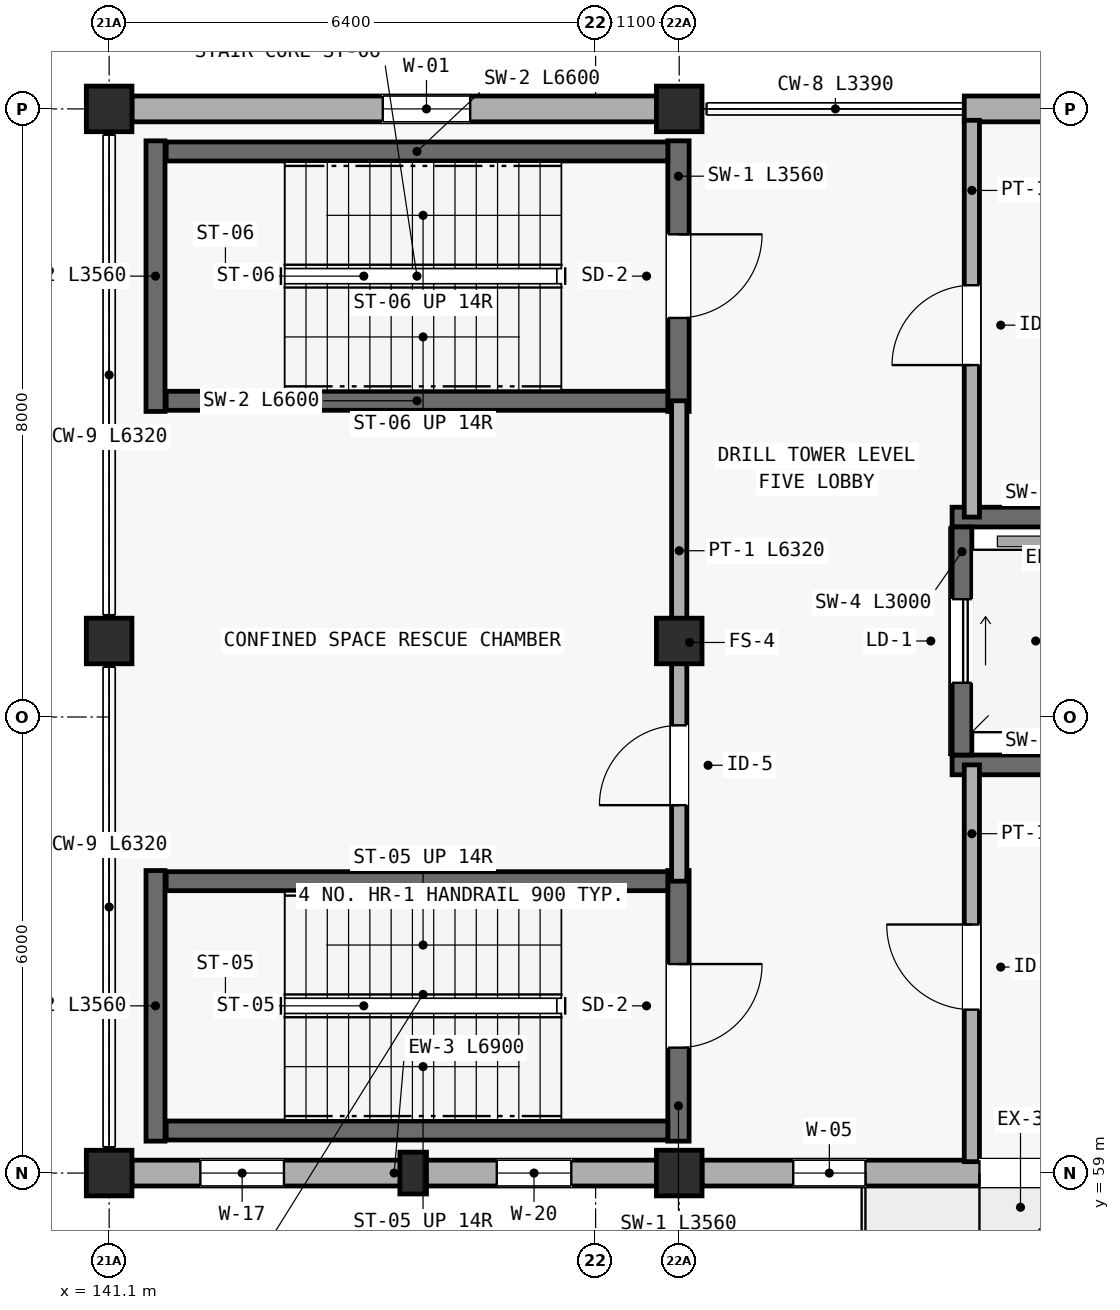
"""IFC4 building model, lengths in metres.
Left out: names, types, materials, properties, quantities, classifications, styles, units other than length and angle.
Written with IfcOpenShell. Run it as: python <this file> out.ifc"""

import sys

from ifc_helpers import new_model, si_unit, direction, frame, frame_2d, origin, origin_2d, place, context, subcontext, project, spatial, rectangle, extrude, element, fill, save


model = new_model("IFC4")
c1 = context("Model", 3, precision=1e-05, world=origin(), true_north=direction((0.0, 1.0)))
c2 = subcontext(c1, "Body", "Model", "MODEL_VIEW")
j1 = project(units=[si_unit("LENGTHUNIT", "METRE"), si_unit("PLANEANGLEUNIT", "RADIAN")], contexts=[c1])
p1 = place(None, origin())
s1 = spatial("IfcSite", under=j1, at=p1, CompositionType="ELEMENT")
p2 = place(p1, origin())
s2 = spatial("IfcBuilding", under=s1, at=p2, CompositionType="ELEMENT")
p3 = place(p2, frame((0.0, 0.0, 17.4)))
s3 = spatial("IfcBuildingStorey", under=s2, at=p3, CompositionType="ELEMENT", Elevation=17.4)
for number, where, z_axis, x_axis in (
    (1, (141.1, 59.0, 0.0), (0.0, 0.0, 1.0), (1.0, 0.0, 0.0)),
    (2, (141.1, 66.0, 0.0), (0.0, 0.0, 1.0), (1.0, 0.0, 0.0)),
    (3, (141.1, 73.0, 0.0), (0.0, 0.0, 1.0), (1.0, 0.0, 0.0)),
    (4, (148.6, 59.0, 0.0), (0.0, 0.0, 1.0), (1.0, 0.0, 0.0)),
    (5, (148.6, 66.0, 0.0), (0.0, 0.0, 1.0), (1.0, 0.0, 0.0)),
    (6, (148.6, 73.0, 0.0), (0.0, 0.0, 1.0), (1.0, 0.0, 0.0)),
):
    element("IfcColumn", number, at=place(p3, frame(where, z_axis=z_axis, x_axis=x_axis)), inside=s3, PredefinedType="COLUMN", context=c2, shape_type="SweptSolid", body=[
        extrude(rectangle(XDim=0.6, YDim=0.6, at=origin_2d()), origin(), (0.0, 0.0, 1.0), 4.65),
    ])
p4 = place(p3, frame((145.1, 59.0, 0.0), z_axis=(0.0, 0.0, 1.0), x_axis=(1.0, 0.0, 0.0)))
e7 = element("IfcColumn", 7, at=p4, inside=s3, PredefinedType="PILASTER", context=c2, shape_type="SweptSolid", body=[
    extrude(rectangle(XDim=0.35, YDim=0.55, at=origin_2d()), origin(), (0.0, 0.0, 1.0), 4.65),
])
p5 = place(p3, frame((141.4, 59.0, 0.0), z_axis=(0.0, 0.0, 1.0), x_axis=(1.0, 0.0, 0.0)))
e8 = element("IfcWall", 8, at=p5, inside=s3, PredefinedType="STANDARD", context=c2, shape_type="SweptSolid", body=[
    extrude(rectangle(XDim=6.9, YDim=0.34, at=frame_2d((3.45, 0.0))), origin(), (0.0, 0.0, 1.0), 3.95),
])
p6 = place(p5, frame((0.9, 0.0, 0.75)))
e9 = element("IfcOpeningElement", 9, at=p6, cuts=e8, PredefinedType="OPENING", context=c2, shape_type="SweptSolid", body=[
    extrude(rectangle(XDim=1.1, YDim=1.35, at=frame_2d((0.55, 0.675))), frame((0.0, 0.18, 0.0), z_axis=(0.0, -1.0, 0.0), x_axis=(1.0, 0.0, 0.0)), (0.0, 0.0, 1.0), 0.36),
])
p7 = place(p5, frame((4.8, 0.0, 0.75)))
e10 = element("IfcOpeningElement", 10, at=p7, cuts=e8, PredefinedType="OPENING", context=c2, shape_type="SweptSolid", body=[
    extrude(rectangle(XDim=0.98, YDim=1.45, at=frame_2d((0.49, 0.725))), frame((0.0, 0.18, 0.0), z_axis=(0.0, -1.0, 0.0), x_axis=(1.0, 0.0, 0.0)), (0.0, 0.0, 1.0), 0.36),
])
p8 = place(p3, frame((148.9, 59.0, 0.0), z_axis=(0.0, 0.0, 1.0), x_axis=(1.0, 0.0, 0.0)))
e11 = element("IfcWall", 11, at=p8, inside=s3, PredefinedType="STANDARD", context=c2, shape_type="SweptSolid", body=[
    extrude(rectangle(XDim=11.8, YDim=0.34, at=frame_2d((5.9, 0.0))), origin(), (0.0, 0.0, 1.0), 3.95),
])
p9 = place(p8, frame((3.65, 0.0, 0.0)))
e12 = element("IfcOpeningElement", 12, at=p9, cuts=e11, PredefinedType="OPENING", context=c2, shape_type="SweptSolid", body=[
    extrude(rectangle(XDim=1.08, YDim=2.1, at=frame_2d((0.54, 1.05))), frame((0.0, 0.18, 0.0), z_axis=(0.0, -1.0, 0.0), x_axis=(1.0, 0.0, 0.0)), (0.0, 0.0, 1.0), 0.36),
])
p10 = place(p8, frame((1.2, 0.0, 0.75)))
e13 = element("IfcOpeningElement", 13, at=p10, cuts=e11, PredefinedType="OPENING", context=c2, shape_type="SweptSolid", body=[
    extrude(rectangle(XDim=0.95, YDim=1.35, at=frame_2d((0.475, 0.675))), frame((0.0, 0.18, 0.0), z_axis=(0.0, -1.0, 0.0), x_axis=(1.0, 0.0, 0.0)), (0.0, 0.0, 1.0), 0.36),
])
p11 = place(p8, frame((6.8, 0.0, 0.75)))
e14 = element("IfcOpeningElement", 14, at=p11, cuts=e11, PredefinedType="OPENING", context=c2, shape_type="SweptSolid", body=[
    extrude(rectangle(XDim=0.95, YDim=1.35, at=frame_2d((0.475, 0.675))), frame((0.0, 0.18, 0.0), z_axis=(0.0, -1.0, 0.0), x_axis=(1.0, 0.0, 0.0)), (0.0, 0.0, 1.0), 0.36),
])
p12 = place(p3, frame((160.7, 73.0, 0.0), z_axis=(0.0, 0.0, 1.0), x_axis=(-1.0, 0.0, 0.0)))
e15 = element("IfcWall", 15, at=p12, inside=s3, PredefinedType="STANDARD", context=c2, shape_type="SweptSolid", body=[
    extrude(rectangle(XDim=8.35, YDim=0.34, at=frame_2d((4.175, 0.0))), origin(), (0.0, 0.0, 1.0), 3.95),
])
p13 = place(p12, frame((1.35, 0.0, 0.75)))
e16 = element("IfcOpeningElement", 16, at=p13, cuts=e15, PredefinedType="OPENING", context=c2, shape_type="SweptSolid", body=[
    extrude(rectangle(XDim=0.88, YDim=1.5, at=frame_2d((0.44, 0.75))), frame((0.0, 0.18, 0.0), z_axis=(0.0, -1.0, 0.0), x_axis=(1.0, 0.0, 0.0)), (0.0, 0.0, 1.0), 0.36),
])
p14 = place(p12, frame((4.95, 0.0, 0.75)))
e17 = element("IfcOpeningElement", 17, at=p14, cuts=e15, PredefinedType="OPENING", context=c2, shape_type="SweptSolid", body=[
    extrude(rectangle(XDim=0.88, YDim=1.5, at=frame_2d((0.44, 0.75))), frame((0.0, 0.18, 0.0), z_axis=(0.0, -1.0, 0.0), x_axis=(1.0, 0.0, 0.0)), (0.0, 0.0, 1.0), 0.36),
])
p15 = place(p3, frame((148.3, 73.0, 0.0), z_axis=(0.0, 0.0, 1.0), x_axis=(-1.0, 0.0, 0.0)))
e18 = element("IfcWall", 18, at=p15, inside=s3, PredefinedType="STANDARD", context=c2, shape_type="SweptSolid", body=[
    extrude(rectangle(XDim=6.9, YDim=0.34, at=frame_2d((3.45, 0.0))), origin(), (0.0, 0.0, 1.0), 3.95),
])
p16 = place(p15, frame((2.45, 0.0, 0.75)))
e19 = element("IfcOpeningElement", 19, at=p16, cuts=e18, PredefinedType="OPENING", context=c2, shape_type="SweptSolid", body=[
    extrude(rectangle(XDim=1.15, YDim=1.45, at=frame_2d((0.575, 0.725))), frame((0.0, 0.18, 0.0), z_axis=(0.0, -1.0, 0.0), x_axis=(1.0, 0.0, 0.0)), (0.0, 0.0, 1.0), 0.36),
])
p17 = place(p3, frame((148.59, 62.98, 0.0), z_axis=(0.0, 0.0, 1.0), x_axis=(0.0, -1.0, 0.0)))
e20 = element("IfcWall", 20, at=p17, inside=s3, PredefinedType="SHEAR", context=c2, shape_type="SweptSolid", body=[
    extrude(rectangle(XDim=3.56, YDim=0.28, at=frame_2d((1.78, 0.0))), origin(), (0.0, 0.0, 1.0), 4.4),
])
p18 = place(p17, frame((1.23, 0.0, 0.0)))
e21 = element("IfcOpeningElement", 21, at=p18, cuts=e20, PredefinedType="OPENING", context=c2, shape_type="SweptSolid", body=[
    extrude(rectangle(XDim=1.1, YDim=2.15, at=frame_2d((0.55, 1.075))), frame((0.0, 0.15, 0.0), z_axis=(0.0, -1.0, 0.0), x_axis=(1.0, 0.0, 0.0)), (0.0, 0.0, 1.0), 0.3),
])
p19 = place(p3, frame((141.71, 59.42, 0.0), z_axis=(0.0, 0.0, 1.0), x_axis=(0.0, 1.0, 0.0)))
e22 = element("IfcWall", 22, at=p19, inside=s3, PredefinedType="SHEAR", context=c2, shape_type="SweptSolid", body=[
    extrude(rectangle(XDim=3.56, YDim=0.25, at=frame_2d((1.78, 0.0))), origin(), (0.0, 0.0, 1.0), 4.4),
])
for number, where, z_axis, x_axis in (
    (23, (148.45, 62.84, 0.0), (0.0, 0.0, 1.0), (-1.0, 0.0, 0.0)),
    (24, (141.85, 59.56, 0.0), (0.0, 0.0, 1.0), (1.0, 0.0, 0.0)),
):
    element("IfcWall", number, at=place(p3, frame(where, z_axis=z_axis, x_axis=x_axis)), inside=s3, PredefinedType="SHEAR", context=c2, shape_type="SweptSolid", body=[
        extrude(rectangle(XDim=6.6, YDim=0.25, at=frame_2d((3.3, 0.0))), origin(), (0.0, 0.0, 1.0), 4.4),
    ])
p20 = place(p3, frame((148.59, 72.58, 0.0), z_axis=(0.0, 0.0, 1.0), x_axis=(0.0, -1.0, 0.0)))
e25 = element("IfcWall", 25, at=p20, inside=s3, PredefinedType="SHEAR", context=c2, shape_type="SweptSolid", body=[
    extrude(rectangle(XDim=3.56, YDim=0.28, at=frame_2d((1.78, 0.0))), origin(), (0.0, 0.0, 1.0), 4.4),
])
p21 = place(p20, frame((1.23, 0.0, 0.0)))
e26 = element("IfcOpeningElement", 26, at=p21, cuts=e25, PredefinedType="OPENING", context=c2, shape_type="SweptSolid", body=[
    extrude(rectangle(XDim=1.1, YDim=2.15, at=frame_2d((0.55, 1.075))), frame((0.0, 0.15, 0.0), z_axis=(0.0, -1.0, 0.0), x_axis=(1.0, 0.0, 0.0)), (0.0, 0.0, 1.0), 0.3),
])
p22 = place(p3, frame((141.71, 69.02, 0.0), z_axis=(0.0, 0.0, 1.0), x_axis=(0.0, 1.0, 0.0)))
e27 = element("IfcWall", 27, at=p22, inside=s3, PredefinedType="SHEAR", context=c2, shape_type="SweptSolid", body=[
    extrude(rectangle(XDim=3.56, YDim=0.25, at=frame_2d((1.78, 0.0))), origin(), (0.0, 0.0, 1.0), 4.4),
])
for number, where, z_axis, x_axis in (
    (28, (148.45, 72.44, 0.0), (0.0, 0.0, 1.0), (-1.0, 0.0, 0.0)),
    (29, (141.85, 69.16, 0.0), (0.0, 0.0, 1.0), (1.0, 0.0, 0.0)),
):
    element("IfcWall", number, at=place(p3, frame(where, z_axis=z_axis, x_axis=x_axis)), inside=s3, PredefinedType="SHEAR", context=c2, shape_type="SweptSolid", body=[
        extrude(rectangle(XDim=6.6, YDim=0.25, at=frame_2d((3.3, 0.0))), origin(), (0.0, 0.0, 1.0), 4.4),
    ])
for number, where, z_axis, x_axis in (
    (30, (152.19, 64.37, 0.0), (0.0, 0.0, 1.0), (1.0, 0.0, 0.0)),
    (31, (155.11, 67.63, 0.0), (0.0, 0.0, 1.0), (-1.0, 0.0, 0.0)),
):
    element("IfcWall", number, at=place(p3, frame(where, z_axis=z_axis, x_axis=x_axis)), inside=s3, PredefinedType="SHEAR", context=c2, shape_type="SweptSolid", body=[
        extrude(rectangle(XDim=2.92, YDim=0.26, at=frame_2d((1.46, 0.0))), origin(), (0.0, 0.0, 1.0), 4.4),
    ])
p23 = place(p3, frame((152.32, 67.5, 0.0), z_axis=(0.0, 0.0, 1.0), x_axis=(0.0, -1.0, 0.0)))
e32 = element("IfcWall", 32, at=p23, inside=s3, PredefinedType="SHEAR", context=c2, shape_type="SweptSolid", body=[
    extrude(rectangle(XDim=3.0, YDim=0.26, at=frame_2d((1.5, 0.0))), origin(), (0.0, 0.0, 1.0), 4.4),
])
p24 = place(p23, frame((0.95, 0.0, 0.0)))
e33 = element("IfcOpeningElement", 33, at=p24, cuts=e32, PredefinedType="OPENING", context=c2, shape_type="SweptSolid", body=[
    extrude(rectangle(XDim=1.1, YDim=2.15, at=frame_2d((0.55, 1.075))), frame((0.0, 0.14, 0.0), z_axis=(0.0, -1.0, 0.0), x_axis=(1.0, 0.0, 0.0)), (0.0, 0.0, 1.0), 0.28),
])
p25 = place(p3, frame((148.6, 62.84, 0.0), z_axis=(0.0, 0.0, 1.0), x_axis=(0.0, 1.0, 0.0)))
e34 = element("IfcWall", 34, at=p25, inside=s3, PredefinedType="PARTITIONING", context=c2, shape_type="SweptSolid", body=[
    extrude(rectangle(XDim=6.32, YDim=0.2, at=frame_2d((3.16, 0.0))), origin(), (0.0, 0.0, 1.0), 3.9),
])
p26 = place(p25, frame((1.0, 0.0, 0.0)))
e35 = element("IfcOpeningElement", 35, at=p26, cuts=e34, PredefinedType="OPENING", context=c2, shape_type="SweptSolid", body=[
    extrude(rectangle(XDim=1.05, YDim=2.14, at=frame_2d((0.525, 1.07))), frame((0.0, 0.11, 0.0), z_axis=(0.0, -1.0, 0.0), x_axis=(1.0, 0.0, 0.0)), (0.0, 0.0, 1.0), 0.22),
])
p27 = place(p3, frame((152.45, 59.15, 0.0), z_axis=(0.0, 0.0, 1.0), x_axis=(0.0, 1.0, 0.0)))
e36 = element("IfcWall", 36, at=p27, inside=s3, PredefinedType="PARTITIONING", context=c2, shape_type="SweptSolid", body=[
    extrude(rectangle(XDim=5.22, YDim=0.2, at=frame_2d((2.61, 0.0))), origin(), (0.0, 0.0, 1.0), 3.9),
])
p28 = place(p27, frame((2.0, 0.0, 0.0)))
e37 = element("IfcOpeningElement", 37, at=p28, cuts=e36, PredefinedType="OPENING", context=c2, shape_type="SweptSolid", body=[
    extrude(rectangle(XDim=1.12, YDim=2.15, at=frame_2d((0.56, 1.075))), frame((0.0, 0.11, 0.0), z_axis=(0.0, -1.0, 0.0), x_axis=(1.0, 0.0, 0.0)), (0.0, 0.0, 1.0), 0.22),
])
p29 = place(p3, frame((152.45, 67.63, 0.0), z_axis=(0.0, 0.0, 1.0), x_axis=(0.0, 1.0, 0.0)))
e38 = element("IfcWall", 38, at=p29, inside=s3, PredefinedType="PARTITIONING", context=c2, shape_type="SweptSolid", body=[
    extrude(rectangle(XDim=5.22, YDim=0.2, at=frame_2d((2.61, 0.0))), origin(), (0.0, 0.0, 1.0), 3.9),
])
p30 = place(p29, frame((2.0, 0.0, 0.0)))
e39 = element("IfcOpeningElement", 39, at=p30, cuts=e38, PredefinedType="OPENING", context=c2, shape_type="SweptSolid", body=[
    extrude(rectangle(XDim=1.05, YDim=2.14, at=frame_2d((0.525, 1.07))), frame((0.0, 0.11, 0.0), z_axis=(0.0, -1.0, 0.0), x_axis=(1.0, 0.0, 0.0)), (0.0, 0.0, 1.0), 0.22),
])
p31 = place(p6, origin())
e40 = element("IfcWindow", 40, at=p31, inside=s3, PartitioningType="SINGLE_PANEL", PredefinedType="WINDOW", context=c2, shape_type="SweptSolid", body=[
    extrude(rectangle(XDim=1.1, YDim=1.35, at=frame_2d((0.55, 0.675))), frame((0.0, 0.03, 0.0), z_axis=(0.0, -1.0, 0.0), x_axis=(1.0, 0.0, 0.0)), (0.0, 0.0, 1.0), 0.06),
])
fill(e9, e40)
p32 = place(p7, origin())
e41 = element("IfcWindow", 41, at=p32, inside=s3, PartitioningType="SINGLE_PANEL", PredefinedType="WINDOW", context=c2, shape_type="SweptSolid", body=[
    extrude(rectangle(XDim=0.98, YDim=1.45, at=frame_2d((0.49, 0.725))), frame((0.0, 0.03, 0.0), z_axis=(0.0, -1.0, 0.0), x_axis=(1.0, 0.0, 0.0)), (0.0, 0.0, 1.0), 0.06),
])
fill(e10, e41)
p33 = place(p9, frame((1.08, 0.0, 0.0), z_axis=(0.0, 0.0, 1.0), x_axis=(-1.0, 0.0, 0.0)))
e42 = element("IfcDoor", 42, at=p33, inside=s3, OperationType="SINGLE_SWING_LEFT", PredefinedType="DOOR", context=c2, shape_type="SweptSolid", body=[
    extrude(rectangle(XDim=1.08, YDim=2.1, at=frame_2d((0.54, 1.05))), frame((0.0, 0.025, 0.0), z_axis=(0.0, -1.0, 0.0), x_axis=(1.0, 0.0, 0.0)), (0.0, 0.0, 1.0), 0.05),
])
fill(e12, e42)
p34 = place(p10, origin())
e43 = element("IfcWindow", 43, at=p34, inside=s3, PartitioningType="SINGLE_PANEL", PredefinedType="WINDOW", context=c2, shape_type="SweptSolid", body=[
    extrude(rectangle(XDim=0.95, YDim=1.35, at=frame_2d((0.475, 0.675))), frame((0.0, 0.03, 0.0), z_axis=(0.0, -1.0, 0.0), x_axis=(1.0, 0.0, 0.0)), (0.0, 0.0, 1.0), 0.06),
])
fill(e13, e43)
p35 = place(p16, origin())
e44 = element("IfcWindow", 44, at=p35, inside=s3, PartitioningType="SINGLE_PANEL", PredefinedType="WINDOW", context=c2, shape_type="SweptSolid", body=[
    extrude(rectangle(XDim=1.15, YDim=1.45, at=frame_2d((0.575, 0.725))), frame((0.0, 0.03, 0.0), z_axis=(0.0, -1.0, 0.0), x_axis=(1.0, 0.0, 0.0)), (0.0, 0.0, 1.0), 0.06),
])
fill(e19, e44)
p36 = place(p18, origin())
e45 = element("IfcDoor", 45, at=p36, inside=s3, OperationType="SINGLE_SWING_LEFT", PredefinedType="DOOR", context=c2, shape_type="SweptSolid", body=[
    extrude(rectangle(XDim=1.1, YDim=2.15, at=frame_2d((0.55, 1.075))), frame((0.0, 0.025, 0.0), z_axis=(0.0, -1.0, 0.0), x_axis=(1.0, 0.0, 0.0)), (0.0, 0.0, 1.0), 0.05),
])
fill(e21, e45)
p37 = place(p21, origin())
e46 = element("IfcDoor", 46, at=p37, inside=s3, OperationType="SINGLE_SWING_LEFT", PredefinedType="DOOR", context=c2, shape_type="SweptSolid", body=[
    extrude(rectangle(XDim=1.1, YDim=2.15, at=frame_2d((0.55, 1.075))), frame((0.0, 0.025, 0.0), z_axis=(0.0, -1.0, 0.0), x_axis=(1.0, 0.0, 0.0)), (0.0, 0.0, 1.0), 0.05),
])
fill(e26, e46)
p38 = place(p24, origin())
e47 = element("IfcDoor", 47, at=p38, inside=s3, OperationType="SLIDING_TO_LEFT", PredefinedType="DOOR", context=c2, shape_type="SweptSolid", body=[
    extrude(rectangle(XDim=1.1, YDim=2.15, at=frame_2d((0.55, 1.075))), frame((0.0, 0.025, 0.0), z_axis=(0.0, -1.0, 0.0), x_axis=(1.0, 0.0, 0.0)), (0.0, 0.0, 1.0), 0.05),
])
fill(e33, e47)
p39 = place(p26, origin())
e48 = element("IfcDoor", 48, at=p39, inside=s3, OperationType="SINGLE_SWING_LEFT", PredefinedType="DOOR", context=c2, shape_type="SweptSolid", body=[
    extrude(rectangle(XDim=1.05, YDim=2.14, at=frame_2d((0.525, 1.07))), frame((0.0, 0.025, 0.0), z_axis=(0.0, -1.0, 0.0), x_axis=(1.0, 0.0, 0.0)), (0.0, 0.0, 1.0), 0.05),
])
fill(e35, e48)
p40 = place(p28, origin())
e49 = element("IfcDoor", 49, at=p40, inside=s3, OperationType="SINGLE_SWING_RIGHT", PredefinedType="DOOR", context=c2, shape_type="SweptSolid", body=[
    extrude(rectangle(XDim=1.12, YDim=2.15, at=frame_2d((0.56, 1.075))), frame((0.0, 0.025, 0.0), z_axis=(0.0, -1.0, 0.0), x_axis=(1.0, 0.0, 0.0)), (0.0, 0.0, 1.0), 0.05),
])
fill(e37, e49)
p41 = place(p30, origin())
e50 = element("IfcDoor", 50, at=p41, inside=s3, OperationType="SINGLE_SWING_LEFT", PredefinedType="DOOR", context=c2, shape_type="SweptSolid", body=[
    extrude(rectangle(XDim=1.05, YDim=2.14, at=frame_2d((0.525, 1.07))), frame((0.0, 0.025, 0.0), z_axis=(0.0, -1.0, 0.0), x_axis=(1.0, 0.0, 0.0)), (0.0, 0.0, 1.0), 0.05),
])
fill(e39, e50)
save(model, sys.argv[1])
